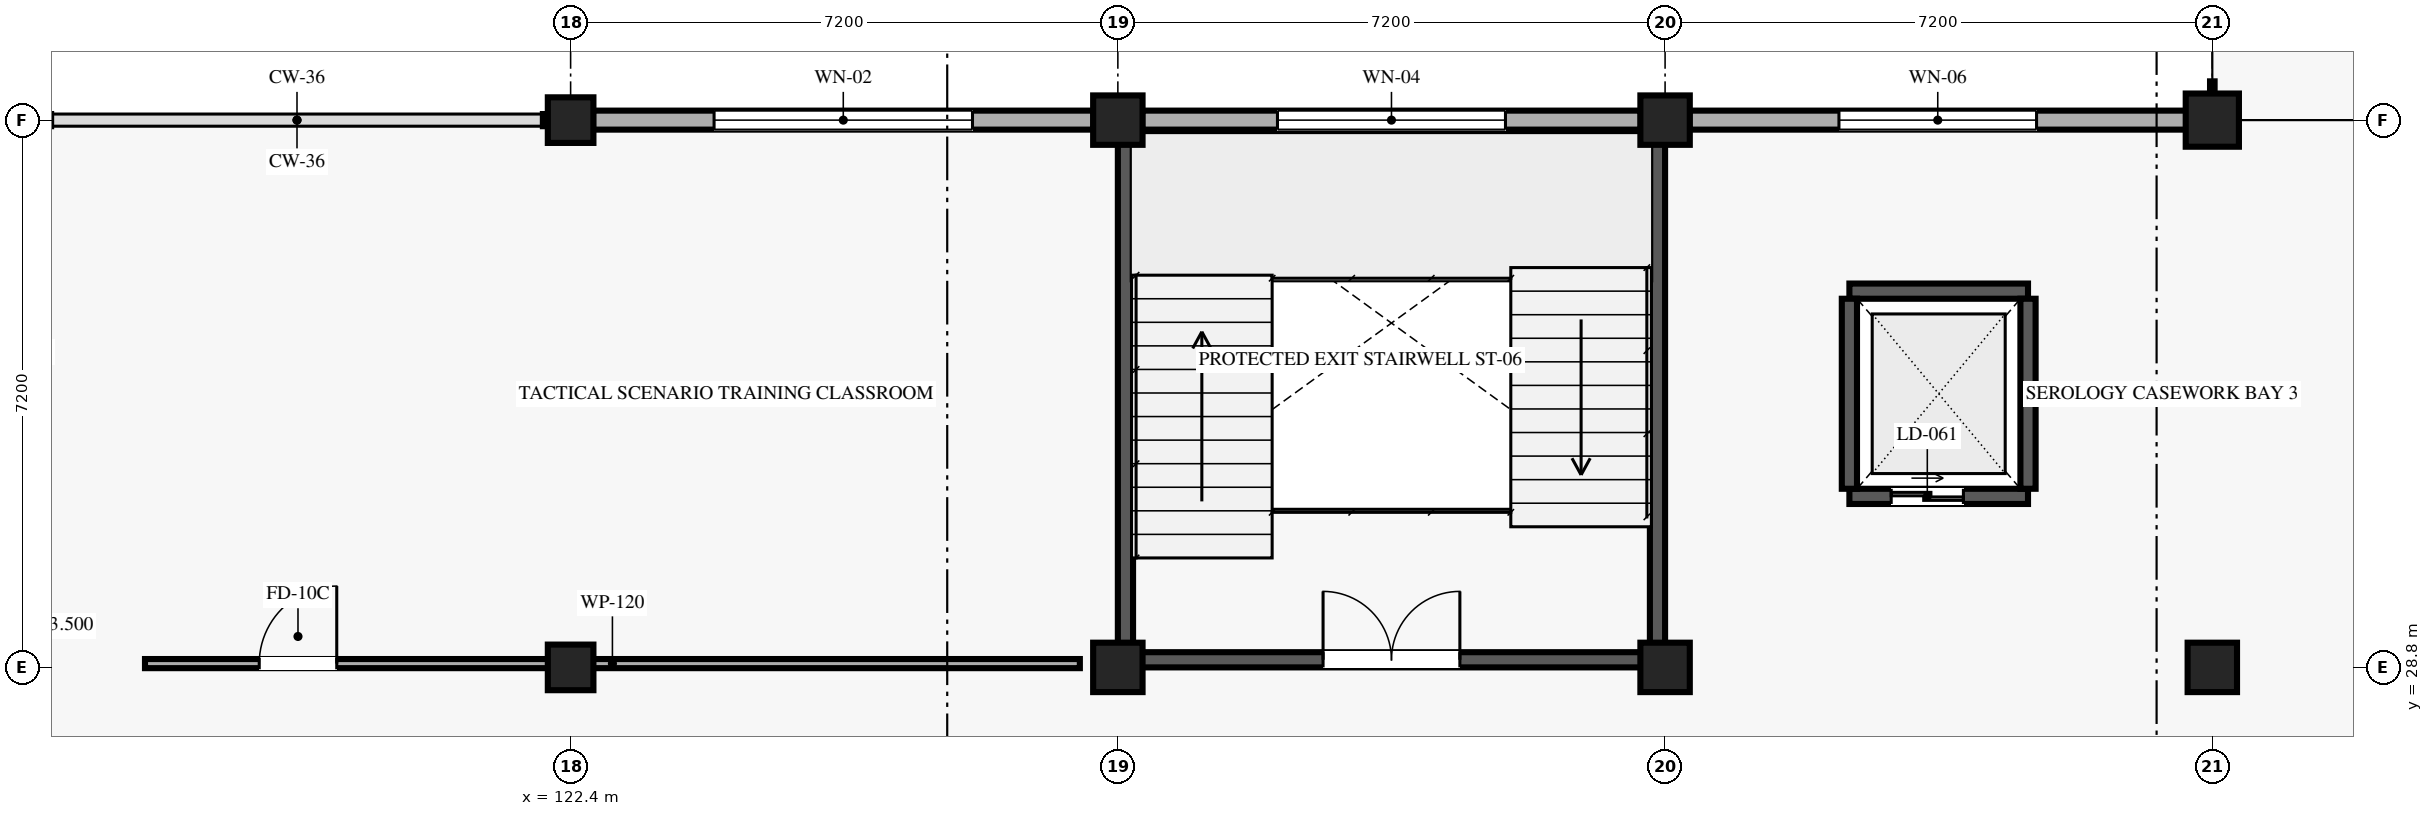
"""IFC4 building model, lengths in metres.
Left out: names, types, materials, properties, quantities, classifications, styles, units other than length and angle.
Written with IfcOpenShell. Run it as: python <this file> out.ifc"""

import sys

from ifc_helpers import new_model, si_unit, direction, frame, frame_2d, origin, origin_2d, place, context, subcontext, project, spatial, rectangle, extrude, element, fill, save


model = new_model("IFC4")
c1 = context("Model", 3, precision=1e-05, world=origin(), true_north=direction((0.0, 1.0)))
c2 = subcontext(c1, "Body", "Model", "MODEL_VIEW")
j1 = project(units=[si_unit("LENGTHUNIT", "METRE"), si_unit("PLANEANGLEUNIT", "RADIAN")], contexts=[c1])
p1 = place(None, origin())
s1 = spatial("IfcSite", under=j1, at=p1, CompositionType="ELEMENT")
p2 = place(p1, origin())
s2 = spatial("IfcBuilding", under=s1, at=p2, CompositionType="ELEMENT")
p3 = place(p2, frame((0.0, 0.0, 13.5)))
s3 = spatial("IfcBuildingStorey", under=s2, at=p3, CompositionType="ELEMENT", Elevation=13.5)
for number, where, z_axis, x_axis in (
    (1, (122.4, 28.8, 0.0), (0.0, 0.0, 1.0), (1.0, 0.0, 0.0)),
    (2, (122.4, 36.0, 0.0), (0.0, 0.0, 1.0), (1.0, 0.0, 0.0)),
):
    element("IfcColumn", number, at=place(p3, frame(where, z_axis=z_axis, x_axis=x_axis)), inside=s3, PredefinedType="COLUMN", context=c2, shape_type="SweptSolid", body=[
        extrude(rectangle(XDim=0.6, YDim=0.6, at=origin_2d()), origin(), (0.0, 0.0, 1.0), 4.05),
    ])
for number, where, z_axis, x_axis in (
    (3, (129.6, 28.8, 0.0), (0.0, 0.0, 1.0), (1.0, 0.0, 0.0)),
    (4, (129.6, 36.0, 0.0), (0.0, 0.0, 1.0), (1.0, 0.0, 0.0)),
    (5, (136.8, 28.8, 0.0), (0.0, 0.0, 1.0), (1.0, 0.0, 0.0)),
    (6, (136.8, 36.0, 0.0), (0.0, 0.0, 1.0), (1.0, 0.0, 0.0)),
    (7, (144.0, 28.8, 0.0), (0.0, 0.0, 1.0), (1.0, 0.0, 0.0)),
):
    element("IfcColumn", number, at=place(p3, frame(where, z_axis=z_axis, x_axis=x_axis)), inside=s3, PredefinedType="COLUMN", context=c2, shape_type="SweptSolid", body=[
        extrude(rectangle(XDim=0.65, YDim=0.65, at=origin_2d()), origin(), (0.0, 0.0, 1.0), 4.05),
    ])
p4 = place(p3, frame((144.0, 36.0, 0.0), z_axis=(0.0, 0.0, 1.0), x_axis=(1.0, 0.0, 0.0)))
e8 = element("IfcColumn", 8, at=p4, inside=s3, PredefinedType="COLUMN", context=c2, shape_type="SweptSolid", body=[
    extrude(rectangle(XDim=0.7, YDim=0.7, at=origin_2d()), origin(), (0.0, 0.0, 1.0), 4.05),
])
p5 = place(p3, frame((122.695, 36.0, 0.0), z_axis=(0.0, 0.0, 1.0), x_axis=(1.0, 0.0, 0.0)))
e9 = element("IfcWall", 9, at=p5, inside=s3, PredefinedType="SOLIDWALL", context=c2, shape_type="SweptSolid", body=[
    extrude(rectangle(XDim=6.585, YDim=0.25, at=frame_2d((3.292, 0.0))), origin(), (0.0, 0.0, 1.0), 3.195),
])
p6 = place(p5, frame((1.593, 0.0, 0.85)))
e10 = element("IfcOpeningElement", 10, at=p6, cuts=e9, PredefinedType="OPENING", context=c2, shape_type="SweptSolid", body=[
    extrude(rectangle(XDim=3.4, YDim=2.0, at=frame_2d((1.7, 1.0))), frame((0.0, 0.135, 0.0), z_axis=(0.0, -1.0, 0.0), x_axis=(1.0, 0.0, 0.0)), (0.0, 0.0, 1.0), 0.27),
])
p7 = place(p3, frame((129.92, 36.0, 0.0), z_axis=(0.0, 0.0, 1.0), x_axis=(1.0, 0.0, 0.0)))
e11 = element("IfcWall", 11, at=p7, inside=s3, PredefinedType="SOLIDWALL", context=c2, shape_type="SweptSolid", body=[
    extrude(rectangle(XDim=6.56, YDim=0.25, at=frame_2d((3.28, 0.0))), origin(), (0.0, 0.0, 1.0), 3.195),
])
p8 = place(p7, frame((1.78, 0.0, 0.85)))
e12 = element("IfcOpeningElement", 12, at=p8, cuts=e11, PredefinedType="OPENING", context=c2, shape_type="SweptSolid", body=[
    extrude(rectangle(XDim=3.0, YDim=1.9, at=frame_2d((1.5, 0.95))), frame((0.0, 0.135, 0.0), z_axis=(0.0, -1.0, 0.0), x_axis=(1.0, 0.0, 0.0)), (0.0, 0.0, 1.0), 0.27),
])
p9 = place(p3, frame((137.12, 36.0, 0.0), z_axis=(0.0, 0.0, 1.0), x_axis=(1.0, 0.0, 0.0)))
e13 = element("IfcWall", 13, at=p9, inside=s3, PredefinedType="SOLIDWALL", context=c2, shape_type="SweptSolid", body=[
    extrude(rectangle(XDim=6.535, YDim=0.25, at=frame_2d((3.268, 0.0))), origin(), (0.0, 0.0, 1.0), 3.195),
])
p10 = place(p9, frame((1.968, 0.0, 0.85)))
e14 = element("IfcOpeningElement", 14, at=p10, cuts=e13, PredefinedType="OPENING", context=c2, shape_type="SweptSolid", body=[
    extrude(rectangle(XDim=2.6, YDim=1.8, at=frame_2d((1.3, 0.9))), frame((0.0, 0.135, 0.0), z_axis=(0.0, -1.0, 0.0), x_axis=(1.0, 0.0, 0.0)), (0.0, 0.0, 1.0), 0.27),
])
p11 = place(p3, frame((129.8, 28.9, 0.0), z_axis=(0.0, 0.0, 1.0), x_axis=(1.0, 0.0, 0.0)))
e15 = element("IfcWall", 15, at=p11, inside=s3, PredefinedType="SHEAR", context=c2, shape_type="SweptSolid", body=[
    extrude(rectangle(XDim=6.8, YDim=0.2, at=frame_2d((3.4, 0.0))), origin(), (0.0, 0.0, 1.0), 3.81),
])
p12 = place(p11, frame((2.5, 0.0, 0.0)))
e16 = element("IfcOpeningElement", 16, at=p12, cuts=e15, PredefinedType="OPENING", context=c2, shape_type="SweptSolid", body=[
    extrude(rectangle(XDim=1.8, YDim=2.2, at=frame_2d((0.9, 1.1))), frame((0.0, 0.11, 0.0), z_axis=(0.0, -1.0, 0.0), x_axis=(1.0, 0.0, 0.0)), (0.0, 0.0, 1.0), 0.22),
])
for number, where, z_axis, x_axis in (
    (17, (129.7, 29.0, 0.0), (0.0, 0.0, 1.0), (0.0, 1.0, 0.0)),
    (18, (136.7, 29.0, 0.0), (0.0, 0.0, 1.0), (0.0, 1.0, 0.0)),
):
    element("IfcWall", number, at=place(p3, frame(where, z_axis=z_axis, x_axis=x_axis)), inside=s3, PredefinedType="SHEAR", context=c2, shape_type="SweptSolid", body=[
        extrude(rectangle(XDim=6.8, YDim=0.2, at=frame_2d((3.4, 0.0))), origin(), (0.0, 0.0, 1.0), 3.81),
    ])
p13 = place(p3, frame((139.225, 31.05, 0.0), z_axis=(0.0, 0.0, 1.0), x_axis=(1.0, 0.0, 0.0)))
e19 = element("IfcWall", 19, at=p13, inside=s3, PredefinedType="SHEAR", context=c2, shape_type="SweptSolid", body=[
    extrude(rectangle(XDim=2.35, YDim=0.2, at=frame_2d((1.175, 0.0))), origin(), (0.0, 0.0, 1.0), 3.81),
])
p14 = place(p13, frame((0.55, 0.0, 0.0)))
e20 = element("IfcOpeningElement", 20, at=p14, cuts=e19, PredefinedType="OPENING", context=c2, shape_type="SweptSolid", body=[
    extrude(rectangle(XDim=0.95, YDim=2.1, at=frame_2d((0.475, 1.05))), frame((0.0, 0.11, 0.0), z_axis=(0.0, -1.0, 0.0), x_axis=(1.0, 0.0, 0.0)), (0.0, 0.0, 1.0), 0.22),
])
p15 = place(p3, frame((139.225, 33.75, 0.0), z_axis=(0.0, 0.0, 1.0), x_axis=(1.0, 0.0, 0.0)))
e21 = element("IfcWall", 21, at=p15, inside=s3, PredefinedType="SHEAR", context=c2, shape_type="SweptSolid", body=[
    extrude(rectangle(XDim=2.35, YDim=0.2, at=frame_2d((1.175, 0.0))), origin(), (0.0, 0.0, 1.0), 3.81),
])
for number, where, z_axis, x_axis in (
    (22, (139.225, 31.15, 0.0), (0.0, 0.0, 1.0), (0.0, 1.0, 0.0)),
    (23, (141.575, 31.15, 0.0), (0.0, 0.0, 1.0), (0.0, 1.0, 0.0)),
):
    element("IfcWall", number, at=place(p3, frame(where, z_axis=z_axis, x_axis=x_axis)), inside=s3, PredefinedType="SHEAR", context=c2, shape_type="SweptSolid", body=[
        extrude(rectangle(XDim=2.5, YDim=0.2, at=frame_2d((1.25, 0.0))), origin(), (0.0, 0.0, 1.0), 3.81),
    ])
p16 = place(p3, frame((116.8, 28.85, 0.0), z_axis=(0.0, 0.0, 1.0), x_axis=(1.0, 0.0, 0.0)))
e24 = element("IfcWall", 24, at=p16, inside=s3, PredefinedType="PARTITIONING", context=c2, shape_type="SweptSolid", body=[
    extrude(rectangle(XDim=12.3, YDim=0.12, at=frame_2d((6.15, 0.0))), origin(), (0.0, 0.0, 1.0), 3.2),
])
p17 = place(p16, frame((1.503, 0.0, 0.0)))
e25 = element("IfcOpeningElement", 25, at=p17, cuts=e24, PredefinedType="OPENING", context=c2, shape_type="SweptSolid", body=[
    extrude(rectangle(XDim=1.02, YDim=2.15, at=frame_2d((0.51, 1.075))), frame((0.0, 0.07, 0.0), z_axis=(0.0, -1.0, 0.0), x_axis=(1.0, 0.0, 0.0)), (0.0, 0.0, 1.0), 0.14),
])
p18 = place(p6, origin())
e26 = element("IfcWindow", 26, at=p18, inside=s3, PartitioningType="SINGLE_PANEL", PredefinedType="WINDOW", context=c2, shape_type="SweptSolid", body=[
    extrude(rectangle(XDim=3.4, YDim=2.0, at=frame_2d((1.7, 1.0))), frame((0.0, 0.03, 0.0), z_axis=(0.0, -1.0, 0.0), x_axis=(1.0, 0.0, 0.0)), (0.0, 0.0, 1.0), 0.06),
])
fill(e10, e26)
p19 = place(p8, origin())
e27 = element("IfcWindow", 27, at=p19, inside=s3, PartitioningType="SINGLE_PANEL", PredefinedType="WINDOW", context=c2, shape_type="SweptSolid", body=[
    extrude(rectangle(XDim=3.0, YDim=1.9, at=frame_2d((1.5, 0.95))), frame((0.0, 0.03, 0.0), z_axis=(0.0, -1.0, 0.0), x_axis=(1.0, 0.0, 0.0)), (0.0, 0.0, 1.0), 0.06),
])
fill(e12, e27)
p20 = place(p10, origin())
e28 = element("IfcWindow", 28, at=p20, inside=s3, PartitioningType="SINGLE_PANEL", PredefinedType="WINDOW", context=c2, shape_type="SweptSolid", body=[
    extrude(rectangle(XDim=2.6, YDim=1.8, at=frame_2d((1.3, 0.9))), frame((0.0, 0.03, 0.0), z_axis=(0.0, -1.0, 0.0), x_axis=(1.0, 0.0, 0.0)), (0.0, 0.0, 1.0), 0.06),
])
fill(e14, e28)
p21 = place(p12, origin())
e29 = element("IfcDoor", 29, at=p21, inside=s3, OperationType="DOUBLE_DOOR_SINGLE_SWING", PredefinedType="DOOR", context=c2, shape_type="SweptSolid", body=[
    extrude(rectangle(XDim=1.8, YDim=2.2, at=frame_2d((0.9, 1.1))), frame((0.0, 0.025, 0.0), z_axis=(0.0, -1.0, 0.0), x_axis=(1.0, 0.0, 0.0)), (0.0, 0.0, 1.0), 0.05),
])
fill(e16, e29)
p22 = place(p14, origin())
e30 = element("IfcDoor", 30, at=p22, inside=s3, OperationType="DOUBLE_DOOR_SLIDING", PredefinedType="DOOR", context=c2, shape_type="SweptSolid", body=[
    extrude(rectangle(XDim=0.95, YDim=2.1, at=frame_2d((0.475, 1.05))), frame((0.0, 0.025, 0.0), z_axis=(0.0, -1.0, 0.0), x_axis=(1.0, 0.0, 0.0)), (0.0, 0.0, 1.0), 0.05),
])
fill(e20, e30)
p23 = place(p17, origin())
e31 = element("IfcDoor", 31, at=p23, inside=s3, OperationType="SINGLE_SWING_RIGHT", PredefinedType="DOOR", context=c2, shape_type="SweptSolid", body=[
    extrude(rectangle(XDim=1.02, YDim=2.15, at=frame_2d((0.51, 1.075))), frame((0.0, 0.025, 0.0), z_axis=(0.0, -1.0, 0.0), x_axis=(1.0, 0.0, 0.0)), (0.0, 0.0, 1.0), 0.05),
])
fill(e25, e31)
save(model, sys.argv[1])
